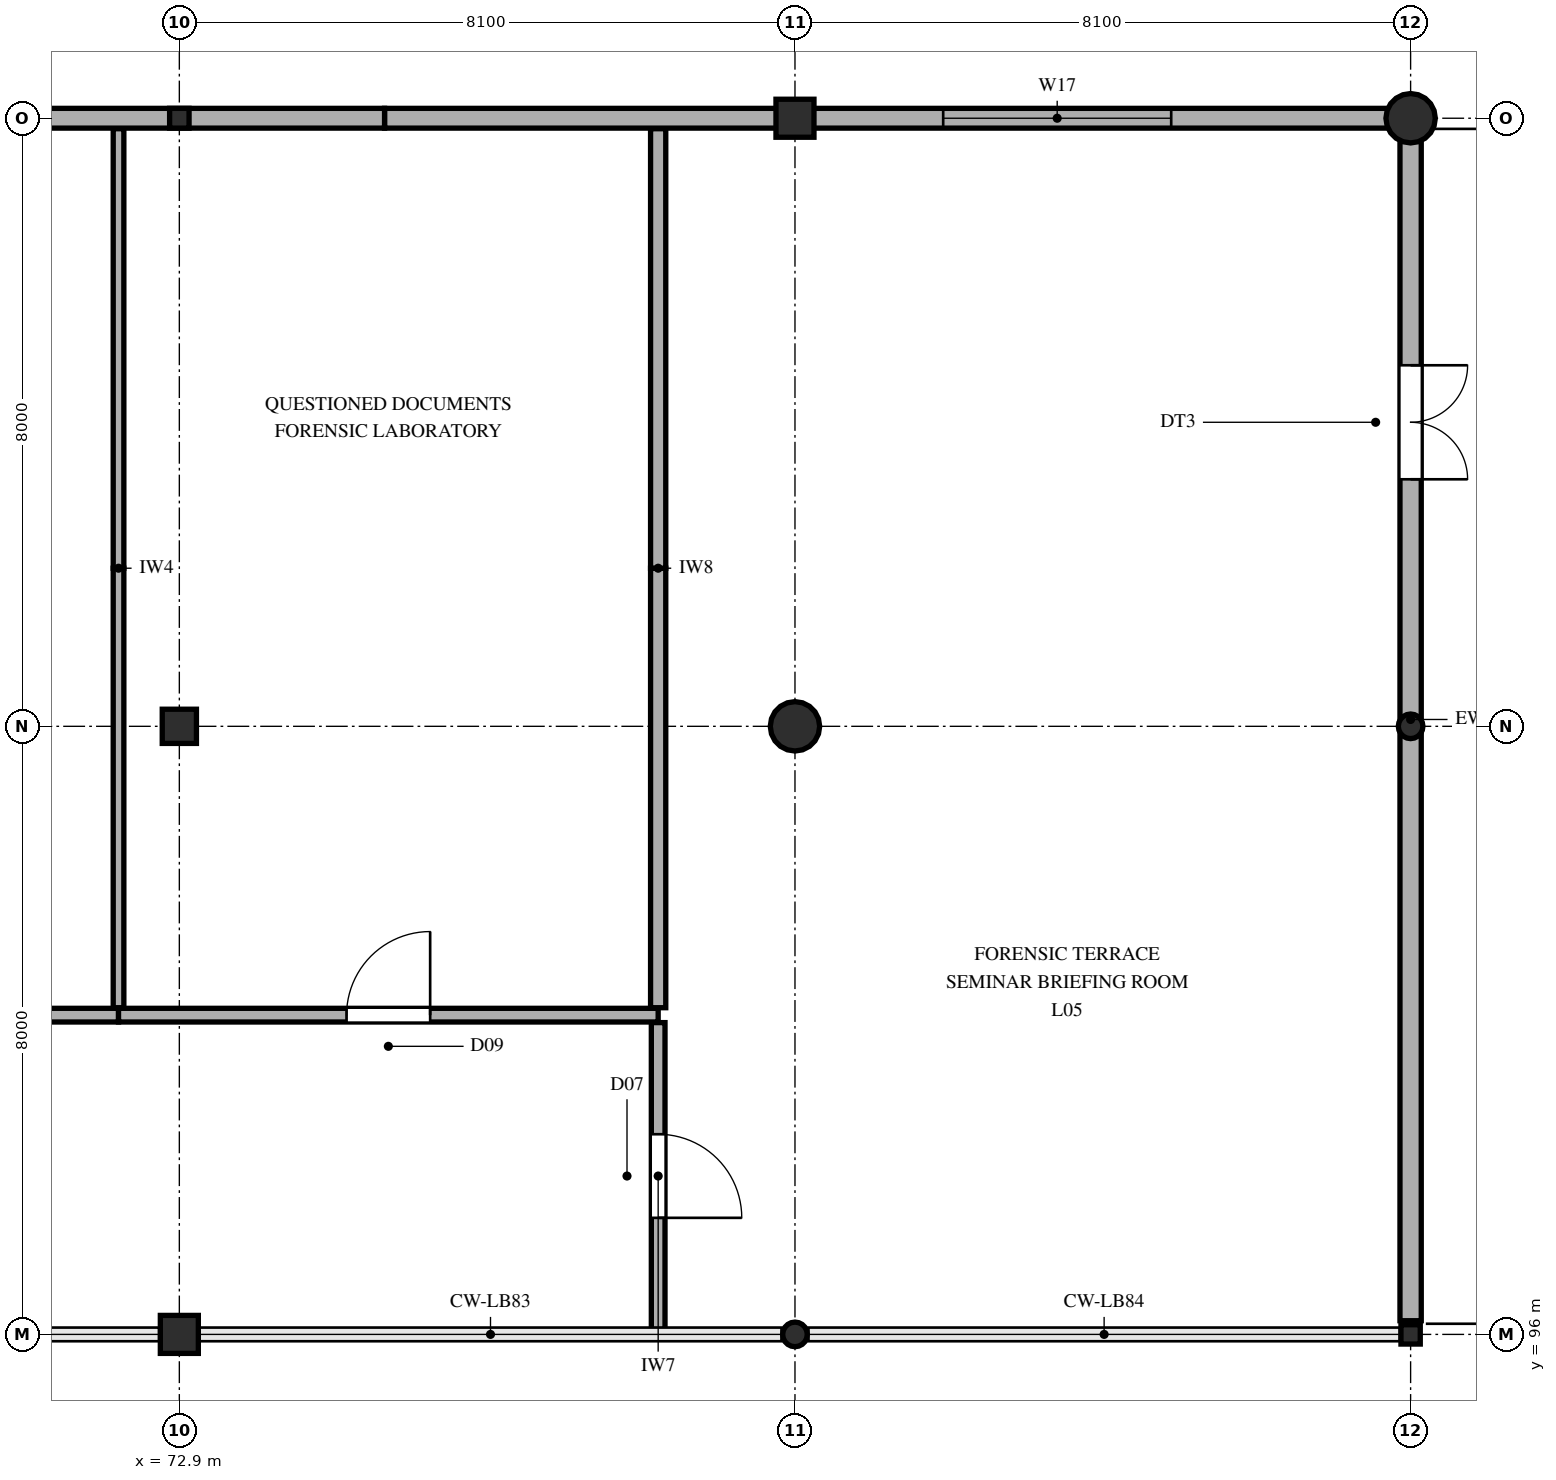
"""IFC4 building model, lengths in metres.
Left out: names, types, materials, properties, quantities, classifications, styles, units other than length and angle.
Written with IfcOpenShell. Run it as: python <this file> out.ifc"""

import sys

from ifc_helpers import new_model, si_unit, direction, frame, frame_2d, origin, origin_2d, place, context, subcontext, project, spatial, rectangle, hollow_rectangle, circle, hollow_circle, i_section, extrude, element, fill, save


model = new_model("IFC4")
c1 = context("Model", 3, precision=1e-05, world=origin(), true_north=direction((0.0, 1.0)))
c2 = subcontext(c1, "Body", "Model", "MODEL_VIEW")
j1 = project(units=[si_unit("LENGTHUNIT", "METRE"), si_unit("PLANEANGLEUNIT", "RADIAN")], contexts=[c1])
p1 = place(None, origin())
s1 = spatial("IfcSite", under=j1, at=p1, CompositionType="ELEMENT")
p2 = place(p1, origin())
s2 = spatial("IfcBuilding", under=s1, at=p2, CompositionType="ELEMENT")
p3 = place(p2, frame((0.0, 0.0, 24.9)))
s3 = spatial("IfcBuildingStorey", under=s2, at=p3, CompositionType="ELEMENT", Elevation=24.9)
p4 = place(p3, frame((72.9, 96.0, 0.0), z_axis=(0.0, 0.0, 1.0), x_axis=(1.0, 0.0, 0.0)))
e1 = element("IfcColumn", 1, at=p4, inside=s3, PredefinedType="COLUMN", context=c2, shape_type="SweptSolid", body=[
    extrude(rectangle(XDim=0.5, YDim=0.5, at=origin_2d()), origin(), (0.0, 0.0, 1.0), 4.2),
])
p5 = place(p3, frame((72.9, 104.0, 0.0), z_axis=(0.0, 0.0, 1.0), x_axis=(1.0, 0.0, 0.0)))
e2 = element("IfcColumn", 2, at=p5, inside=s3, PredefinedType="COLUMN", context=c2, shape_type="SweptSolid", body=[
    extrude(rectangle(XDim=0.45, YDim=0.45, at=origin_2d()), origin(), (0.0, 0.0, 1.0), 4.2),
])
p6 = place(p3, frame((72.9, 112.0, 0.0), z_axis=(0.0, 0.0, 1.0), x_axis=(1.0, 0.0, 0.0)))
e3 = element("IfcColumn", 3, at=p6, inside=s3, PredefinedType="COLUMN", context=c2, shape_type="SweptSolid", body=[
    extrude(i_section(OverallWidth=0.256, OverallDepth=0.26, WebThickness=0.011, FlangeThickness=0.017, FilletRadius=0.013, at=origin_2d()), origin(), (0.0, 0.0, 1.0), 4.2),
])
p7 = place(p3, frame((81.0, 96.0, 0.0), z_axis=(0.0, 0.0, 1.0), x_axis=(1.0, 0.0, 0.0)))
e4 = element("IfcColumn", 4, at=p7, inside=s3, PredefinedType="COLUMN", context=c2, shape_type="SweptSolid", body=[
    extrude(hollow_circle(Radius=0.162, WallThickness=0.013, at=origin_2d()), origin(), (0.0, 0.0, 1.0), 3.86),
])
p8 = place(p3, frame((81.0, 104.0, 0.0), z_axis=(0.0, 0.0, 1.0), x_axis=(1.0, 0.0, 0.0)))
e5 = element("IfcColumn", 5, at=p8, inside=s3, PredefinedType="COLUMN", context=c2, shape_type="SweptSolid", body=[
    extrude(circle(Radius=0.325, at=origin_2d()), origin(), (0.0, 0.0, 1.0), 3.86),
])
p9 = place(p3, frame((81.0, 112.0, 0.0), z_axis=(0.0, 0.0, 1.0), x_axis=(1.0, 0.0, 0.0)))
e6 = element("IfcColumn", 6, at=p9, inside=s3, PredefinedType="COLUMN", context=c2, shape_type="SweptSolid", body=[
    extrude(rectangle(XDim=0.5, YDim=0.5, at=origin_2d()), origin(), (0.0, 0.0, 1.0), 3.86),
])
p10 = place(p3, frame((89.1, 96.0, 0.0), z_axis=(0.0, 0.0, 1.0), x_axis=(1.0, 0.0, 0.0)))
e7 = element("IfcColumn", 7, at=p10, inside=s3, PredefinedType="COLUMN", context=c2, shape_type="SweptSolid", body=[
    extrude(hollow_rectangle(XDim=0.254, YDim=0.254, WallThickness=0.013, InnerFilletRadius=0.013, OuterFilletRadius=0.025, at=origin_2d()), origin(), (0.0, 0.0, 1.0), 3.86),
])
p11 = place(p3, frame((89.1, 104.0, 0.0), z_axis=(0.0, 0.0, 1.0), x_axis=(1.0, 0.0, 0.0)))
e8 = element("IfcColumn", 8, at=p11, inside=s3, PredefinedType="COLUMN", context=c2, shape_type="SweptSolid", body=[
    extrude(hollow_circle(Radius=0.162, WallThickness=0.013, at=origin_2d()), origin(), (0.0, 0.0, 1.0), 3.86),
])
p12 = place(p3, frame((89.1, 112.0, 0.0), z_axis=(0.0, 0.0, 1.0), x_axis=(1.0, 0.0, 0.0)))
e9 = element("IfcColumn", 9, at=p12, inside=s3, PredefinedType="COLUMN", context=c2, shape_type="SweptSolid", body=[
    extrude(circle(Radius=0.325, at=origin_2d()), origin(), (0.0, 0.0, 1.0), 3.86),
])
p13 = place(p3, frame((89.1, 96.18, 0.0), z_axis=(0.0, 0.0, 1.0), x_axis=(0.0, 1.0, 0.0)))
e10 = element("IfcWall", 10, at=p13, inside=s3, PredefinedType="SOLIDWALL", context=c2, shape_type="SweptSolid", body=[
    extrude(rectangle(XDim=15.82, YDim=0.28, at=frame_2d((7.91, 0.0))), origin(), (0.0, 0.0, 1.0), 3.352),
])
p14 = place(p13, frame((11.07, 0.0, 0.0)))
e11 = element("IfcOpeningElement", 11, at=p14, cuts=e10, PredefinedType="OPENING", context=c2, shape_type="SweptSolid", body=[
    extrude(rectangle(XDim=1.5, YDim=2.3, at=frame_2d((0.75, 1.15))), frame((0.0, 0.15, 0.0), z_axis=(0.0, -1.0, 0.0), x_axis=(1.0, 0.0, 0.0)), (0.0, 0.0, 1.0), 0.3),
])
p15 = place(p3, frame((89.1, 112.0, 0.0), z_axis=(0.0, 0.0, 1.0), x_axis=(-1.0, 0.0, 0.0)))
e12 = element("IfcWall", 12, at=p15, inside=s3, PredefinedType="SOLIDWALL", context=c2, shape_type="SweptSolid", body=[
    extrude(rectangle(XDim=13.5, YDim=0.26, at=frame_2d((6.75, 0.0))), origin(), (0.0, 0.0, 1.0), 3.302),
])
p16 = place(p15, frame((3.15, 0.0, 0.95)))
e13 = element("IfcOpeningElement", 13, at=p16, cuts=e12, PredefinedType="OPENING", context=c2, shape_type="SweptSolid", body=[
    extrude(rectangle(XDim=3.0, YDim=1.8, at=frame_2d((1.5, 0.9))), frame((0.0, 0.14, 0.0), z_axis=(0.0, -1.0, 0.0), x_axis=(1.0, 0.0, 0.0)), (0.0, 0.0, 1.0), 0.28),
])
p17 = place(p3, frame((75.6, 112.0, 0.0), z_axis=(0.0, 0.0, 1.0), x_axis=(-1.0, 0.0, 0.0)))
e14 = element("IfcWall", 14, at=p17, inside=s3, PredefinedType="SOLIDWALL", context=c2, shape_type="SweptSolid", body=[
    extrude(rectangle(XDim=13.5, YDim=0.26, at=frame_2d((6.75, 0.0))), origin(), (0.0, 0.0, 1.0), 3.302),
])
p18 = place(p17, frame((5.4, 0.0, 0.95)))
e15 = element("IfcOpeningElement", 15, at=p18, cuts=e14, PredefinedType="OPENING", context=c2, shape_type="SweptSolid", body=[
    extrude(rectangle(XDim=3.15, YDim=1.6, at=frame_2d((1.575, 0.8))), frame((0.0, 0.14, 0.0), z_axis=(0.0, -1.0, 0.0), x_axis=(1.0, 0.0, 0.0)), (0.0, 0.0, 1.0), 0.28),
])
p19 = place(p3, frame((65.0, 100.2, 0.0), z_axis=(0.0, 0.0, 1.0), x_axis=(1.0, 0.0, 0.0)))
e16 = element("IfcWall", 16, at=p19, inside=s3, PredefinedType="PARTITIONING", context=c2, shape_type="SweptSolid", body=[
    extrude(rectangle(XDim=7.1, YDim=0.18, at=frame_2d((3.55, 0.0))), origin(), (0.0, 0.0, 1.0), 3.96),
])
p20 = place(p19, frame((3.0, 0.0, 0.0)))
e17 = element("IfcOpeningElement", 17, at=p20, cuts=e16, PredefinedType="OPENING", context=c2, shape_type="SweptSolid", body=[
    extrude(rectangle(XDim=1.1, YDim=2.3, at=frame_2d((0.55, 1.15))), frame((0.0, 0.1, 0.0), z_axis=(0.0, -1.0, 0.0), x_axis=(1.0, 0.0, 0.0)), (0.0, 0.0, 1.0), 0.2),
])
p21 = place(p3, frame((72.1, 100.2, 0.0), z_axis=(0.0, 0.0, 1.0), x_axis=(1.0, 0.0, 0.0)))
e18 = element("IfcWall", 18, at=p21, inside=s3, PredefinedType="PARTITIONING", context=c2, shape_type="SweptSolid", body=[
    extrude(rectangle(XDim=7.1, YDim=0.18, at=frame_2d((3.55, 0.0))), origin(), (0.0, 0.0, 1.0), 3.96),
])
p22 = place(p21, frame((3.0, 0.0, 0.0)))
e19 = element("IfcOpeningElement", 19, at=p22, cuts=e18, PredefinedType="OPENING", context=c2, shape_type="SweptSolid", body=[
    extrude(rectangle(XDim=1.1, YDim=2.3, at=frame_2d((0.55, 1.15))), frame((0.0, 0.1, 0.0), z_axis=(0.0, -1.0, 0.0), x_axis=(1.0, 0.0, 0.0)), (0.0, 0.0, 1.0), 0.2),
])
for number, where, z_axis, x_axis in (
    (20, (72.1, 100.298, 0.0), (0.0, 0.0, 1.0), (0.0, 1.0, 0.0)),
    (21, (72.1, 106.08, 0.0), (0.0, 0.0, 1.0), (0.0, 1.0, 0.0)),
):
    element("IfcWall", number, at=place(p3, frame(where, z_axis=z_axis, x_axis=x_axis)), inside=s3, PredefinedType="PARTITIONING", context=c2, shape_type="SweptSolid", body=[
        extrude(rectangle(XDim=5.782, YDim=0.14, at=frame_2d((2.891, 0.0))), origin(), (0.0, 0.0, 1.0), 3.96),
    ])
p23 = place(p3, frame((79.2, 96.065, 0.0), z_axis=(0.0, 0.0, 1.0), x_axis=(0.0, 1.0, 0.0)))
e22 = element("IfcWall", 22, at=p23, inside=s3, PredefinedType="PARTITIONING", context=c2, shape_type="SweptSolid", body=[
    extrude(rectangle(XDim=4.037, YDim=0.18, at=frame_2d((2.019, 0.0))), origin(), (0.0, 0.0, 1.0), 3.96),
])
p24 = place(p23, frame((1.469, 0.0, 0.0)))
e23 = element("IfcOpeningElement", 23, at=p24, cuts=e22, PredefinedType="OPENING", context=c2, shape_type="SweptSolid", body=[
    extrude(rectangle(XDim=1.1, YDim=2.2, at=frame_2d((0.55, 1.1))), frame((0.0, 0.1, 0.0), z_axis=(0.0, -1.0, 0.0), x_axis=(1.0, 0.0, 0.0)), (0.0, 0.0, 1.0), 0.2),
])
for number, where, z_axis, x_axis in (
    (24, (79.2, 100.298, 0.0), (0.0, 0.0, 1.0), (0.0, 1.0, 0.0)),
    (25, (79.2, 106.08, 0.0), (0.0, 0.0, 1.0), (0.0, 1.0, 0.0)),
):
    element("IfcWall", number, at=place(p3, frame(where, z_axis=z_axis, x_axis=x_axis)), inside=s3, PredefinedType="PARTITIONING", context=c2, shape_type="SweptSolid", body=[
        extrude(rectangle(XDim=5.782, YDim=0.2, at=frame_2d((2.891, 0.0))), origin(), (0.0, 0.0, 1.0), 3.96),
    ])
p25 = place(p14, frame((1.5, 0.0, 0.0), z_axis=(0.0, 0.0, 1.0), x_axis=(-1.0, 0.0, 0.0)))
e26 = element("IfcDoor", 26, at=p25, inside=s3, OperationType="DOUBLE_DOOR_SINGLE_SWING", PredefinedType="DOOR", context=c2, shape_type="SweptSolid", body=[
    extrude(rectangle(XDim=1.5, YDim=2.3, at=frame_2d((0.75, 1.15))), frame((0.0, 0.025, 0.0), z_axis=(0.0, -1.0, 0.0), x_axis=(1.0, 0.0, 0.0)), (0.0, 0.0, 1.0), 0.05),
])
fill(e11, e26)
p26 = place(p16, origin())
e27 = element("IfcWindow", 27, at=p26, inside=s3, PartitioningType="TRIPLE_PANEL_VERTICAL", PredefinedType="WINDOW", context=c2, shape_type="SweptSolid", body=[
    extrude(rectangle(XDim=3.0, YDim=1.8, at=frame_2d((1.5, 0.9))), frame((0.0, 0.03, 0.0), z_axis=(0.0, -1.0, 0.0), x_axis=(1.0, 0.0, 0.0)), (0.0, 0.0, 1.0), 0.06),
])
fill(e13, e27)
p27 = place(p22, origin())
e28 = element("IfcDoor", 28, at=p27, inside=s3, OperationType="SINGLE_SWING_RIGHT", PredefinedType="DOOR", context=c2, shape_type="SweptSolid", body=[
    extrude(rectangle(XDim=1.1, YDim=2.3, at=frame_2d((0.55, 1.15))), frame((0.0, 0.025, 0.0), z_axis=(0.0, -1.0, 0.0), x_axis=(1.0, 0.0, 0.0)), (0.0, 0.0, 1.0), 0.05),
])
fill(e19, e28)
p28 = place(p24, frame((1.1, 0.0, 0.0), z_axis=(0.0, 0.0, 1.0), x_axis=(-1.0, 0.0, 0.0)))
e29 = element("IfcDoor", 29, at=p28, inside=s3, OperationType="SINGLE_SWING_LEFT", PredefinedType="DOOR", context=c2, shape_type="SweptSolid", body=[
    extrude(rectangle(XDim=1.1, YDim=2.2, at=frame_2d((0.55, 1.1))), frame((0.0, 0.025, 0.0), z_axis=(0.0, -1.0, 0.0), x_axis=(1.0, 0.0, 0.0)), (0.0, 0.0, 1.0), 0.05),
])
fill(e23, e29)
save(model, sys.argv[1])
